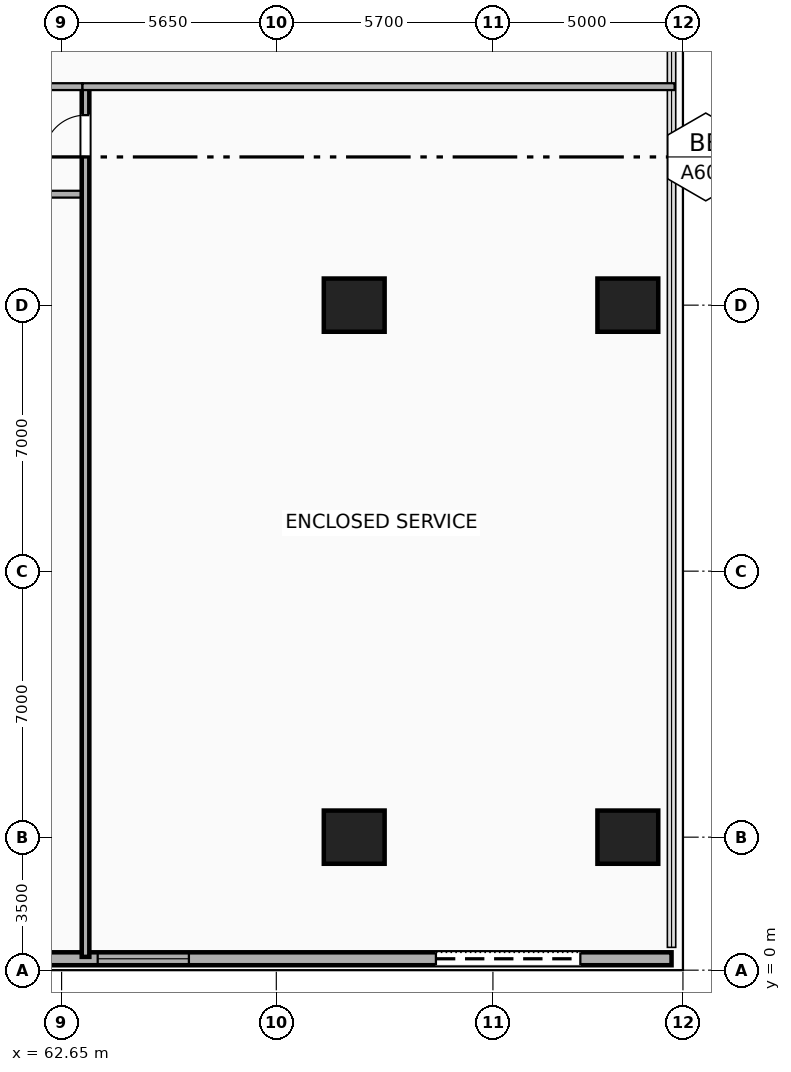
"""IFC4 building model, lengths in metres.
Left out: names, types, materials, properties, quantities, classifications, styles, units other than length and angle.
Written with IfcOpenShell. Run it as: python <this file> out.ifc"""

import sys

from ifc_helpers import new_model, si_unit, direction, frame, frame_2d, origin, origin_2d, place, context, subcontext, project, spatial, rectangle, extrude, element, fill, save


model = new_model("IFC4")
c1 = context("Model", 3, precision=1e-05, world=origin(), true_north=direction((0.0, 1.0)))
c2 = subcontext(c1, "Body", "Model", "MODEL_VIEW")
j1 = project(units=[si_unit("LENGTHUNIT", "METRE"), si_unit("PLANEANGLEUNIT", "RADIAN")], contexts=[c1])
p1 = place(None, origin())
s1 = spatial("IfcSite", under=j1, at=p1, CompositionType="ELEMENT")
p2 = place(p1, origin())
s2 = spatial("IfcBuilding", under=s1, at=p2, CompositionType="ELEMENT")
p3 = place(p2, origin())
s3 = spatial("IfcBuildingStorey", under=s2, at=p3, CompositionType="ELEMENT", Elevation=0.0)
for number, where, z_axis, x_axis in (
    (1, (70.35, 3.5, -0.35), (0.0, 0.0, 1.0), (1.0, 0.0, 0.0)),
    (2, (77.55, 3.5, -0.35), (0.0, 0.0, 1.0), (1.0, 0.0, 0.0)),
    (3, (70.35, 17.5, -0.35), (0.0, 0.0, 1.0), (1.0, 0.0, 0.0)),
    (4, (77.55, 17.5, -0.35), (0.0, 0.0, 1.0), (1.0, 0.0, 0.0)),
):
    element("IfcColumn", number, at=place(p3, frame(where, z_axis=z_axis, x_axis=x_axis)), inside=s3, PredefinedType="COLUMN", context=c2, shape_type="SweptSolid", body=[
        extrude(rectangle(XDim=1.6, YDim=1.4, at=origin_2d()), origin(), (0.0, 0.0, 1.0), 5.45),
    ])
p4 = place(p3, frame((-4.7, 0.3, 0.0), z_axis=(0.0, 0.0, 1.0), x_axis=(1.0, 0.0, 0.0)))
e5 = element("IfcWall", 5, at=p4, inside=s3, PredefinedType="SOLIDWALL", context=c2, shape_type="SweptSolid", body=[
    extrude(rectangle(XDim=83.4, YDim=0.34, at=frame_2d((41.7, 0.0))), origin(), (0.0, 0.0, 1.0), 5.1),
])
p5 = place(p4, frame((24.78, 0.0, 0.0), z_axis=(0.0, 0.0, 1.0), x_axis=(-1.0, 0.0, 0.0)))
e6 = element("IfcOpeningElement", 6, at=p5, cuts=e5, PredefinedType="OPENING", context=c2, shape_type="SweptSolid", body=[
    extrude(rectangle(XDim=2.0, YDim=2.4, at=frame_2d((1.0, 1.2))), frame((0.0, 0.18, 0.0), z_axis=(0.0, -1.0, 0.0), x_axis=(1.0, 0.0, 0.0)), (0.0, 0.0, 1.0), 0.36),
])
p6 = place(p4, frame((38.85, 0.0, 0.0), z_axis=(0.0, 0.0, 1.0), x_axis=(-1.0, 0.0, 0.0)))
e7 = element("IfcOpeningElement", 7, at=p6, cuts=e5, PredefinedType="OPENING", context=c2, shape_type="SweptSolid", body=[
    extrude(rectangle(XDim=2.0, YDim=2.4, at=frame_2d((1.0, 1.2))), frame((0.0, 0.18, 0.0), z_axis=(0.0, -1.0, 0.0), x_axis=(1.0, 0.0, 0.0)), (0.0, 0.0, 1.0), 0.36),
])
p7 = place(p4, frame((57.35, 0.0, 0.0), z_axis=(0.0, 0.0, 1.0), x_axis=(-1.0, 0.0, 0.0)))
e8 = element("IfcOpeningElement", 8, at=p7, cuts=e5, PredefinedType="OPENING", context=c2, shape_type="SweptSolid", body=[
    extrude(rectangle(XDim=2.0, YDim=2.4, at=frame_2d((1.0, 1.2))), frame((0.0, 0.18, 0.0), z_axis=(0.0, -1.0, 0.0), x_axis=(1.0, 0.0, 0.0)), (0.0, 0.0, 1.0), 0.36),
])
p8 = place(p4, frame((81.0, 0.0, 0.0), z_axis=(0.0, 0.0, 1.0), x_axis=(-1.0, 0.0, 0.0)))
e9 = element("IfcOpeningElement", 9, at=p8, cuts=e5, PredefinedType="OPENING", context=c2, shape_type="SweptSolid", body=[
    extrude(rectangle(XDim=3.8, YDim=3.4, at=frame_2d((1.9, 1.7))), frame((0.0, 0.18, 0.0), z_axis=(0.0, -1.0, 0.0), x_axis=(1.0, 0.0, 0.0)), (0.0, 0.0, 1.0), 0.36),
])
p9 = place(p4, frame((9.9, 0.0, 0.9)))
e10 = element("IfcOpeningElement", 10, at=p9, cuts=e5, PredefinedType="OPENING", context=c2, shape_type="SweptSolid", body=[
    extrude(rectangle(XDim=2.4, YDim=2.6, at=frame_2d((1.2, 1.3))), frame((0.0, 0.18, 0.0), z_axis=(0.0, -1.0, 0.0), x_axis=(1.0, 0.0, 0.0)), (0.0, 0.0, 1.0), 0.36),
])
p10 = place(p4, frame((14.3, 0.0, 0.9)))
e11 = element("IfcOpeningElement", 11, at=p10, cuts=e5, PredefinedType="OPENING", context=c2, shape_type="SweptSolid", body=[
    extrude(rectangle(XDim=2.4, YDim=2.6, at=frame_2d((1.2, 1.3))), frame((0.0, 0.18, 0.0), z_axis=(0.0, -1.0, 0.0), x_axis=(1.0, 0.0, 0.0)), (0.0, 0.0, 1.0), 0.36),
])
p11 = place(p4, frame((27.5, 0.0, 0.9)))
e12 = element("IfcOpeningElement", 12, at=p11, cuts=e5, PredefinedType="OPENING", context=c2, shape_type="SweptSolid", body=[
    extrude(rectangle(XDim=2.4, YDim=2.6, at=frame_2d((1.2, 1.3))), frame((0.0, 0.18, 0.0), z_axis=(0.0, -1.0, 0.0), x_axis=(1.0, 0.0, 0.0)), (0.0, 0.0, 1.0), 0.36),
])
p12 = place(p4, frame((45.9, 0.0, 0.9)))
e13 = element("IfcOpeningElement", 13, at=p12, cuts=e5, PredefinedType="OPENING", context=c2, shape_type="SweptSolid", body=[
    extrude(rectangle(XDim=2.4, YDim=2.6, at=frame_2d((1.2, 1.3))), frame((0.0, 0.18, 0.0), z_axis=(0.0, -1.0, 0.0), x_axis=(1.0, 0.0, 0.0)), (0.0, 0.0, 1.0), 0.36),
])
p13 = place(p4, frame((61.5, 0.0, 0.9)))
e14 = element("IfcOpeningElement", 14, at=p13, cuts=e5, PredefinedType="OPENING", context=c2, shape_type="SweptSolid", body=[
    extrude(rectangle(XDim=2.4, YDim=2.6, at=frame_2d((1.2, 1.3))), frame((0.0, 0.18, 0.0), z_axis=(0.0, -1.0, 0.0), x_axis=(1.0, 0.0, 0.0)), (0.0, 0.0, 1.0), 0.36),
])
p14 = place(p4, frame((68.3, 0.0, 0.9)))
e15 = element("IfcOpeningElement", 15, at=p14, cuts=e5, PredefinedType="OPENING", context=c2, shape_type="SweptSolid", body=[
    extrude(rectangle(XDim=2.4, YDim=2.6, at=frame_2d((1.2, 1.3))), frame((0.0, 0.18, 0.0), z_axis=(0.0, -1.0, 0.0), x_axis=(1.0, 0.0, 0.0)), (0.0, 0.0, 1.0), 0.36),
])
p15 = place(p3, frame((56.48, 20.42, 0.0), z_axis=(0.0, 0.0, 1.0), x_axis=(1.0, 0.0, 0.0)))
e16 = element("IfcWall", 16, at=p15, inside=s3, PredefinedType="PARTITIONING", context=c2, shape_type="SweptSolid", body=[
    extrude(rectangle(XDim=6.8, YDim=0.18, at=frame_2d((3.4, 0.0))), origin(), (0.0, 0.0, 1.0), 4.164),
])
p16 = place(p15, frame((1.288, 0.0, 0.0), z_axis=(0.0, 0.0, 1.0), x_axis=(-1.0, 0.0, 0.0)))
e17 = element("IfcOpeningElement", 17, at=p16, cuts=e16, PredefinedType="OPENING", context=c2, shape_type="SweptSolid", body=[
    extrude(rectangle(XDim=0.95, YDim=2.15, at=frame_2d((0.475, 1.075))), frame((0.0, 0.1, 0.0), z_axis=(0.0, -1.0, 0.0), x_axis=(1.0, 0.0, 0.0)), (0.0, 0.0, 1.0), 0.2),
])
p17 = place(p3, frame((63.28, 0.35, 0.0), z_axis=(0.0, 0.0, 1.0), x_axis=(0.0, 1.0, 0.0)))
e18 = element("IfcWall", 18, at=p17, inside=s3, PredefinedType="PARTITIONING", context=c2, shape_type="SweptSolid", body=[
    extrude(rectangle(XDim=22.9, YDim=0.2, at=frame_2d((11.45, 0.0))), origin(), (0.0, 0.0, 1.0), 4.164),
])
p18 = place(p17, frame((22.15, 0.0, 0.0), z_axis=(0.0, 0.0, 1.0), x_axis=(-1.0, 0.0, 0.0)))
e19 = element("IfcOpeningElement", 19, at=p18, cuts=e18, PredefinedType="OPENING", context=c2, shape_type="SweptSolid", body=[
    extrude(rectangle(XDim=1.1, YDim=2.15, at=frame_2d((0.55, 1.075))), frame((0.0, 0.11, 0.0), z_axis=(0.0, -1.0, 0.0), x_axis=(1.0, 0.0, 0.0)), (0.0, 0.0, 1.0), 0.22),
])
p19 = place(p3, frame((56.5, 23.25, 0.0), z_axis=(0.0, 0.0, 1.0), x_axis=(1.0, 0.0, 0.0)))
e20 = element("IfcWall", 20, at=p19, inside=s3, PredefinedType="PARTITIONING", context=c2, shape_type="SweptSolid", body=[
    extrude(rectangle(XDim=6.7, YDim=0.18, at=frame_2d((3.35, 0.0))), origin(), (0.0, 0.0, 1.0), 4.23),
])
p20 = place(p19, frame((2.55, 0.0, 0.0)))
e21 = element("IfcOpeningElement", 21, at=p20, cuts=e20, PredefinedType="OPENING", context=c2, shape_type="SweptSolid", body=[
    extrude(rectangle(XDim=1.6, YDim=2.22, at=frame_2d((0.8, 1.11))), frame((0.0, 0.1, 0.0), z_axis=(0.0, -1.0, 0.0), x_axis=(1.0, 0.0, 0.0)), (0.0, 0.0, 1.0), 0.2),
])
p21 = place(p3, frame((63.2, 23.25, 0.0), z_axis=(0.0, 0.0, 1.0), x_axis=(1.0, 0.0, 0.0)))
e22 = element("IfcWall", 22, at=p21, inside=s3, PredefinedType="PARTITIONING", context=c2, shape_type="SweptSolid", body=[
    extrude(rectangle(XDim=15.58, YDim=0.18, at=frame_2d((7.79, 0.0))), origin(), (0.0, 0.0, 1.0), 4.23),
])
p22 = place(p8, origin())
e23 = element("IfcDoor", 23, at=p22, inside=s3, OperationType="ROLLINGUP", PredefinedType="GATE", context=c2, shape_type="SweptSolid", body=[
    extrude(rectangle(XDim=3.8, YDim=3.4, at=frame_2d((1.9, 1.7))), frame((0.0, 0.025, 0.0), z_axis=(0.0, -1.0, 0.0), x_axis=(1.0, 0.0, 0.0)), (0.0, 0.0, 1.0), 0.05),
])
fill(e9, e23)
p23 = place(p14, origin())
e24 = element("IfcWindow", 24, at=p23, inside=s3, PartitioningType="SINGLE_PANEL", PredefinedType="WINDOW", context=c2, shape_type="SweptSolid", body=[
    extrude(rectangle(XDim=2.4, YDim=2.6, at=frame_2d((1.2, 1.3))), frame((0.0, 0.03, 0.0), z_axis=(0.0, -1.0, 0.0), x_axis=(1.0, 0.0, 0.0)), (0.0, 0.0, 1.0), 0.06),
])
fill(e15, e24)
p24 = place(p18, origin())
e25 = element("IfcDoor", 25, at=p24, inside=s3, OperationType="SINGLE_SWING_LEFT", PredefinedType="DOOR", context=c2, shape_type="SweptSolid", body=[
    extrude(rectangle(XDim=1.1, YDim=2.15, at=frame_2d((0.55, 1.075))), frame((0.0, 0.025, 0.0), z_axis=(0.0, -1.0, 0.0), x_axis=(1.0, 0.0, 0.0)), (0.0, 0.0, 1.0), 0.05),
])
fill(e19, e25)
save(model, sys.argv[1])
